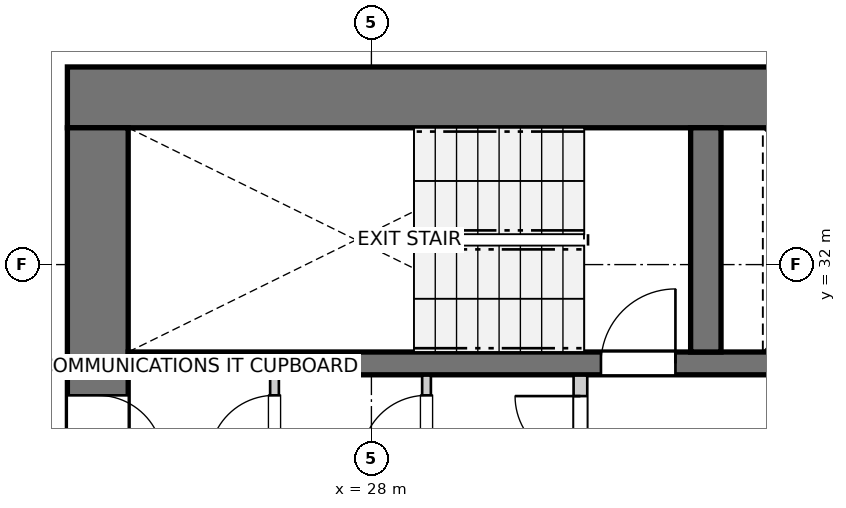
"""IFC4 building model, lengths in metres.
Left out: names, types, materials, properties, quantities, classifications, styles, units other than length and angle.
Written with IfcOpenShell. Run it as: python <this file> out.ifc"""

import sys

from ifc_helpers import new_model, si_unit, direction, frame, frame_2d, origin, place, context, subcontext, project, spatial, rectangle, extrude, source, transform, mapped, element, fill, save


model = new_model("IFC4")
c1 = context("Model", 3, precision=1e-05, world=origin(), true_north=direction((0.0, 1.0)))
c2 = subcontext(c1, "Body", "Model", "MODEL_VIEW")
j1 = project(units=[si_unit("LENGTHUNIT", "METRE"), si_unit("PLANEANGLEUNIT", "RADIAN")], contexts=[c1])
p1 = place(None, origin())
s1 = spatial("IfcSite", under=j1, at=p1, CompositionType="ELEMENT")
p2 = place(p1, origin())
s2 = spatial("IfcBuilding", under=s1, at=p2, CompositionType="ELEMENT")
p3 = place(p2, frame((0.0, 0.0, 33.4)))
s3 = spatial("IfcBuildingStorey", under=s2, at=p3, CompositionType="ELEMENT", Elevation=33.4)
p4 = place(p3, frame((36.7, 34.2, 0.0), z_axis=(0.0, 0.0, 1.0), x_axis=(-1.0, 0.0, 0.0)))
e1 = element("IfcWall", 1, at=p4, inside=s3, PredefinedType="SHEAR", context=c2, shape_type="SweptSolid", body=[
    extrude(rectangle(XDim=12.7, YDim=0.8, at=frame_2d((6.35, 0.0))), origin(), (0.0, 0.0, 1.0), 2.94),
])
p5 = place(p3, frame((24.4, 33.8, 0.0), z_axis=(0.0, 0.0, 1.0), x_axis=(0.0, -1.0, 0.0)))
e2 = element("IfcWall", 2, at=p5, inside=s3, PredefinedType="SHEAR", context=c2, shape_type="SweptSolid", body=[
    extrude(rectangle(XDim=15.6, YDim=0.8, at=frame_2d((7.8, 0.0))), origin(), (0.0, 0.0, 1.0), 2.94),
])
p6 = place(p5, frame((7.05, 0.0, 0.0)))
e3 = element("IfcOpeningElement", 3, at=p6, cuts=e2, PredefinedType="OPENING", context=c2, shape_type="SweptSolid", body=[
    extrude(rectangle(XDim=1.5, YDim=2.15, at=frame_2d((0.75, 1.075))), frame((0.0, 0.41, 0.0), z_axis=(0.0, -1.0, 0.0), x_axis=(1.0, 0.0, 0.0)), (0.0, 0.0, 1.0), 0.82),
])
p7 = place(p5, frame((3.52, 0.0, 0.0)))
e4 = element("IfcOpeningElement", 4, at=p7, cuts=e2, PredefinedType="OPENING", context=c2, shape_type="SweptSolid", body=[
    extrude(rectangle(XDim=0.86, YDim=2.05, at=frame_2d((0.43, 1.025))), frame((0.0, 0.41, 0.0), z_axis=(0.0, -1.0, 0.0), x_axis=(1.0, 0.0, 0.0)), (0.0, 0.0, 1.0), 0.82),
])
p8 = place(p5, frame((11.22, 0.0, 0.0)))
e5 = element("IfcOpeningElement", 5, at=p8, cuts=e2, PredefinedType="OPENING", context=c2, shape_type="SweptSolid", body=[
    extrude(rectangle(XDim=0.86, YDim=2.05, at=frame_2d((0.43, 1.025))), frame((0.0, 0.41, 0.0), z_axis=(0.0, -1.0, 0.0), x_axis=(1.0, 0.0, 0.0)), (0.0, 0.0, 1.0), 0.82),
])
p9 = place(p3, frame((24.8, 30.7, 0.0), z_axis=(0.0, 0.0, 1.0), x_axis=(1.0, 0.0, 0.0)))
e6 = element("IfcWall", 6, at=p9, inside=s3, PredefinedType="SHEAR", context=c2, shape_type="SweptSolid", body=[
    extrude(rectangle(XDim=11.1, YDim=0.3, at=frame_2d((5.55, 0.0))), origin(), (0.0, 0.0, 1.0), 2.94),
])
p10 = place(p9, frame((6.22, 0.0, 0.0)))
e7 = element("IfcOpeningElement", 7, at=p10, cuts=e6, PredefinedType="OPENING", context=c2, shape_type="SweptSolid", body=[
    extrude(rectangle(XDim=0.98, YDim=2.15, at=frame_2d((0.49, 1.075))), frame((0.0, 0.16, 0.0), z_axis=(0.0, -1.0, 0.0), x_axis=(1.0, 0.0, 0.0)), (0.0, 0.0, 1.0), 0.32),
])
p11 = place(p9, frame((9.15, 0.0, 0.0)))
e8 = element("IfcOpeningElement", 8, at=p11, cuts=e6, PredefinedType="OPENING", context=c2, shape_type="SweptSolid", body=[
    extrude(rectangle(XDim=1.15, YDim=2.15, at=frame_2d((0.575, 1.075))), frame((0.0, 0.16, 0.0), z_axis=(0.0, -1.0, 0.0), x_axis=(1.0, 0.0, 0.0)), (0.0, 0.0, 1.0), 0.32),
])
p12 = place(p3, frame((32.4, 30.85, 0.0), z_axis=(0.0, 0.0, 1.0), x_axis=(0.0, 1.0, 0.0)))
e9 = element("IfcWall", 9, at=p12, inside=s3, PredefinedType="SHEAR", context=c2, shape_type="SweptSolid", body=[
    extrude(rectangle(XDim=2.95, YDim=0.4, at=frame_2d((1.475, 0.0))), origin(), (0.0, 0.0, 1.0), 2.94),
])
p13 = place(p3, frame((30.75, 27.43, 0.0), z_axis=(0.0, 0.0, 1.0), x_axis=(0.0, 1.0, 0.0)))
e10 = element("IfcWall", 10, at=p13, inside=s3, PredefinedType="PARTITIONING", context=c2, shape_type="SweptSolid", body=[
    extrude(rectangle(XDim=3.11, YDim=0.18, at=frame_2d((1.555, 0.0))), origin(), (0.0, 0.0, 1.0), 2.94),
])
p14 = place(p13, frame((1.98, 0.0, 0.0)))
e11 = element("IfcOpeningElement", 11, at=p14, cuts=e10, PredefinedType="OPENING", context=c2, shape_type="SweptSolid", body=[
    extrude(rectangle(XDim=0.86, YDim=2.05, at=frame_2d((0.43, 1.025))), frame((0.0, 0.1, 0.0), z_axis=(0.0, -1.0, 0.0), x_axis=(1.0, 0.0, 0.0)), (0.0, 0.0, 1.0), 0.2),
])
p15 = place(p3, frame((26.725, 29.16, 0.0), z_axis=(0.0, 0.0, 1.0), x_axis=(0.0, 1.0, 0.0)))
e12 = element("IfcWall", 12, at=p15, inside=s3, PredefinedType="PARTITIONING", context=c2, shape_type="SweptSolid", body=[
    extrude(rectangle(XDim=1.38, YDim=0.115, at=frame_2d((0.69, 0.0))), origin(), (0.0, 0.0, 1.0), 2.94),
])
p16 = place(p15, frame((0.26, 0.0, 0.0)))
e13 = element("IfcOpeningElement", 13, at=p16, cuts=e12, PredefinedType="OPENING", context=c2, shape_type="SweptSolid", body=[
    extrude(rectangle(XDim=0.86, YDim=2.05, at=frame_2d((0.43, 1.025))), frame((0.0, 0.067, 0.0), z_axis=(0.0, -1.0, 0.0), x_axis=(1.0, 0.0, 0.0)), (0.0, 0.0, 1.0), 0.135),
])
p17 = place(p3, frame((28.725, 29.16, 0.0), z_axis=(0.0, 0.0, 1.0), x_axis=(0.0, 1.0, 0.0)))
e14 = element("IfcWall", 14, at=p17, inside=s3, PredefinedType="PARTITIONING", context=c2, shape_type="SweptSolid", body=[
    extrude(rectangle(XDim=1.38, YDim=0.115, at=frame_2d((0.69, 0.0))), origin(), (0.0, 0.0, 1.0), 2.94),
])
p18 = place(p17, frame((0.26, 0.0, 0.0)))
e15 = element("IfcOpeningElement", 15, at=p18, cuts=e14, PredefinedType="OPENING", context=c2, shape_type="SweptSolid", body=[
    extrude(rectangle(XDim=0.86, YDim=2.05, at=frame_2d((0.43, 1.025))), frame((0.0, 0.067, 0.0), z_axis=(0.0, -1.0, 0.0), x_axis=(1.0, 0.0, 0.0)), (0.0, 0.0, 1.0), 0.135),
])
m1 = source(origin(), c2, "Body", "SweptSolid", [
    extrude(rectangle(XDim=0.98, YDim=2.15, at=frame_2d((0.49, 1.075))), frame((0.0, 0.025, 0.0), z_axis=(0.0, -1.0, 0.0), x_axis=(1.0, 0.0, 0.0)), (0.0, 0.0, 1.0), 0.05),
])
p19 = place(p10, origin())
e16 = element("IfcDoor", 16, at=p19, inside=s3, OperationType="SINGLE_SWING_RIGHT", PredefinedType="DOOR", context=c2, shape_type="MappedRepresentation", body=[
    mapped(m1, transform((0.0, 0.0, 0.0), x_axis=(1.0, 0.0, 0.0), y_axis=(0.0, 1.0, 0.0), z_axis=(0.0, 0.0, 1.0), scale=1.0)),
])
fill(e7, e16)
m2 = source(origin(), c2, "Body", "SweptSolid", [
    extrude(rectangle(XDim=0.86, YDim=2.05, at=frame_2d((0.43, 1.025))), frame((0.0, 0.025, 0.0), z_axis=(0.0, -1.0, 0.0), x_axis=(1.0, 0.0, 0.0)), (0.0, 0.0, 1.0), 0.05),
])
p20 = place(p7, origin())
e17 = element("IfcDoor", 17, at=p20, inside=s3, OperationType="SINGLE_SWING_RIGHT", PredefinedType="DOOR", context=c2, shape_type="MappedRepresentation", body=[
    mapped(m2, transform((0.0, 0.0, 0.0), x_axis=(1.0, 0.0, 0.0), y_axis=(0.0, 1.0, 0.0), z_axis=(0.0, 0.0, 1.0), scale=1.0)),
])
fill(e4, e17)
p21 = place(p14, origin())
e18 = element("IfcDoor", 18, at=p21, inside=s3, OperationType="SINGLE_SWING_RIGHT", PredefinedType="DOOR", context=c2, shape_type="MappedRepresentation", body=[
    mapped(m2, transform((0.0, 0.0, 0.0), x_axis=(1.0, 0.0, 0.0), y_axis=(0.0, 1.0, 0.0), z_axis=(0.0, 0.0, 1.0), scale=1.0)),
])
fill(e11, e18)
p22 = place(p16, origin())
e19 = element("IfcDoor", 19, at=p22, inside=s3, OperationType="SINGLE_SWING_LEFT", PredefinedType="DOOR", context=c2, shape_type="MappedRepresentation", body=[
    mapped(m2, transform((0.0, 0.0, 0.0), x_axis=(1.0, 0.0, 0.0), y_axis=(0.0, 1.0, 0.0), z_axis=(0.0, 0.0, 1.0), scale=1.0)),
])
fill(e13, e19)
p23 = place(p18, origin())
e20 = element("IfcDoor", 20, at=p23, inside=s3, OperationType="SINGLE_SWING_LEFT", PredefinedType="DOOR", context=c2, shape_type="MappedRepresentation", body=[
    mapped(m2, transform((0.0, 0.0, 0.0), x_axis=(1.0, 0.0, 0.0), y_axis=(0.0, 1.0, 0.0), z_axis=(0.0, 0.0, 1.0), scale=1.0)),
])
fill(e15, e20)
save(model, sys.argv[1])
